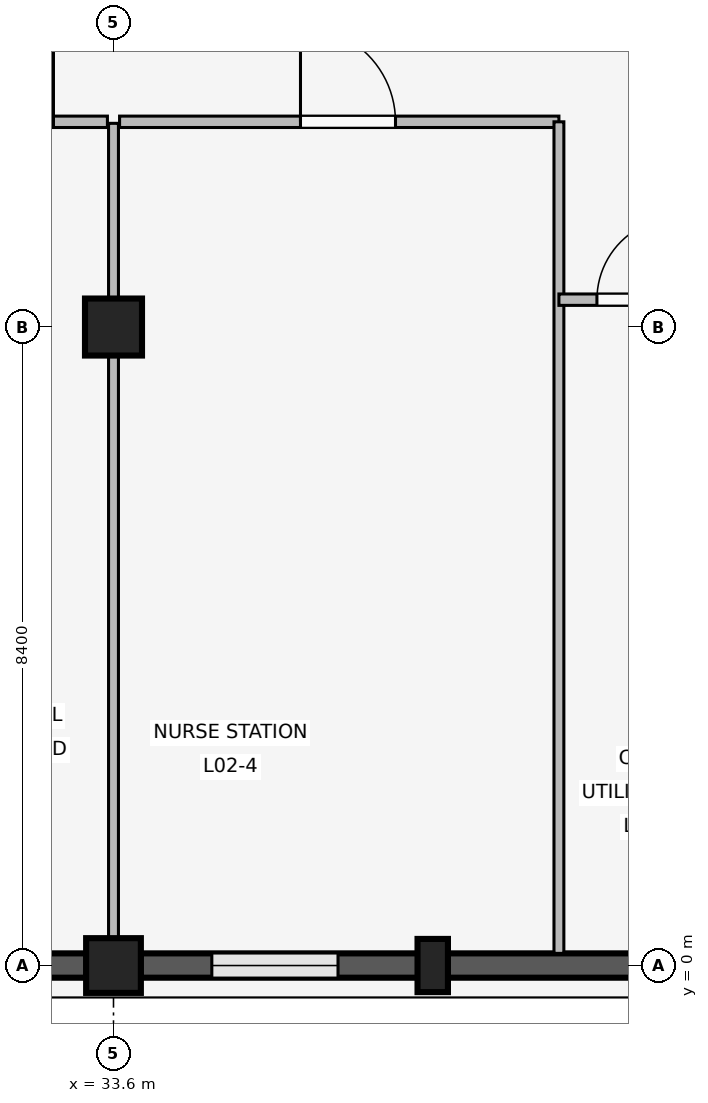
"""IFC4 building model, lengths in metres.
Left out: names, types, materials, properties, quantities, classifications, styles, units other than length and angle.
Written with IfcOpenShell. Run it as: python <this file> out.ifc"""

import sys

from ifc_helpers import new_model, si_unit, direction, frame, frame_2d, origin, origin_2d, place, context, subcontext, project, spatial, rectangle, extrude, element, fill, save


model = new_model("IFC4")
c1 = context("Model", 3, precision=1e-05, world=origin(), true_north=direction((0.0, 1.0)))
c2 = subcontext(c1, "Body", "Model", "MODEL_VIEW")
j1 = project(units=[si_unit("LENGTHUNIT", "METRE"), si_unit("PLANEANGLEUNIT", "RADIAN")], contexts=[c1])
p1 = place(None, origin())
s1 = spatial("IfcSite", under=j1, at=p1, CompositionType="ELEMENT")
p2 = place(p1, origin())
s2 = spatial("IfcBuilding", under=s1, at=p2, CompositionType="ELEMENT")
p3 = place(p2, frame((0.0, 0.0, 8.1)))
s3 = spatial("IfcBuildingStorey", under=s2, at=p3, CompositionType="ELEMENT", Elevation=8.1)
p4 = place(p3, frame((33.6, 0.0, 0.0), z_axis=(0.0, 0.0, 1.0), x_axis=(1.0, 0.0, 0.0)))
e1 = element("IfcColumn", 1, at=p4, inside=s3, PredefinedType="COLUMN", context=c2, shape_type="SweptSolid", body=[
    extrude(rectangle(XDim=0.72, YDim=0.72, at=origin_2d()), origin(), (0.0, 0.0, 1.0), 4.8),
])
p5 = place(p3, frame((33.6, 8.4, 0.0), z_axis=(0.0, 0.0, 1.0), x_axis=(1.0, 0.0, 0.0)))
e2 = element("IfcColumn", 2, at=p5, inside=s3, PredefinedType="COLUMN", context=c2, shape_type="SweptSolid", body=[
    extrude(rectangle(XDim=0.75, YDim=0.75, at=origin_2d()), origin(), (0.0, 0.0, 1.0), 4.8),
])
p6 = place(p3, frame((37.8, 0.0, 0.0), z_axis=(0.0, 0.0, 1.0), x_axis=(1.0, 0.0, 0.0)))
e3 = element("IfcColumn", 3, at=p6, inside=s3, PredefinedType="PILASTER", context=c2, shape_type="SweptSolid", body=[
    extrude(rectangle(XDim=0.4, YDim=0.7, at=origin_2d()), origin(), (0.0, 0.0, 1.0), 4.8),
])
p7 = place(p3, frame((33.245, 0.0, 0.0), z_axis=(0.0, 0.0, 1.0), x_axis=(-1.0, 0.0, 0.0)))
e4 = element("IfcWall", 4, at=p7, inside=s3, PredefinedType="SOLIDWALL", context=c2, shape_type="SweptSolid", body=[
    extrude(rectangle(XDim=7.69, YDim=0.32, at=frame_2d((3.845, 0.0))), origin(), (0.0, 0.0, 1.0), 3.86),
])
p8 = place(p7, frame((1.059, 0.0, 0.85)))
e5 = element("IfcOpeningElement", 5, at=p8, cuts=e4, PredefinedType="OPENING", context=c2, shape_type="SweptSolid", body=[
    extrude(rectangle(XDim=1.42, YDim=1.45, at=frame_2d((0.71, 0.725))), frame((0.0, 0.17, 0.0), z_axis=(0.0, -1.0, 0.0), x_axis=(1.0, 0.0, 0.0)), (0.0, 0.0, 1.0), 0.34),
])
p9 = place(p7, frame((5.211, 0.0, 0.85)))
e6 = element("IfcOpeningElement", 6, at=p9, cuts=e4, PredefinedType="OPENING", context=c2, shape_type="SweptSolid", body=[
    extrude(rectangle(XDim=1.42, YDim=1.45, at=frame_2d((0.71, 0.725))), frame((0.0, 0.17, 0.0), z_axis=(0.0, -1.0, 0.0), x_axis=(1.0, 0.0, 0.0)), (0.0, 0.0, 1.0), 0.34),
])
p10 = place(p3, frame((41.645, 0.0, 0.0), z_axis=(0.0, 0.0, 1.0), x_axis=(-1.0, 0.0, 0.0)))
e7 = element("IfcWall", 7, at=p10, inside=s3, PredefinedType="SOLIDWALL", context=c2, shape_type="SweptSolid", body=[
    extrude(rectangle(XDim=7.69, YDim=0.32, at=frame_2d((3.845, 0.0))), origin(), (0.0, 0.0, 1.0), 3.86),
])
p11 = place(p10, frame((5.091, 0.0, 0.85)))
e8 = element("IfcOpeningElement", 8, at=p11, cuts=e7, PredefinedType="OPENING", context=c2, shape_type="SweptSolid", body=[
    extrude(rectangle(XDim=1.66, YDim=1.95, at=frame_2d((0.83, 0.975))), frame((0.0, 0.17, 0.0), z_axis=(0.0, -1.0, 0.0), x_axis=(1.0, 0.0, 0.0)), (0.0, 0.0, 1.0), 0.34),
])
p12 = place(p3, frame((25.28, 11.1, 0.0), z_axis=(0.0, 0.0, 1.0), x_axis=(1.0, 0.0, 0.0)))
e9 = element("IfcWall", 9, at=p12, inside=s3, PredefinedType="PARTITIONING", context=c2, shape_type="SweptSolid", body=[
    extrude(rectangle(XDim=8.24, YDim=0.15, at=frame_2d((4.12, 0.0))), origin(), (0.0, 0.0, 1.0), 3.84),
])
p13 = place(p12, frame((2.53, 0.0, 0.0)))
e10 = element("IfcOpeningElement", 10, at=p13, cuts=e9, PredefinedType="OPENING", context=c2, shape_type="SweptSolid", body=[
    extrude(rectangle(XDim=1.3, YDim=2.25, at=frame_2d((0.65, 1.125))), frame((0.0, 0.085, 0.0), z_axis=(0.0, -1.0, 0.0), x_axis=(1.0, 0.0, 0.0)), (0.0, 0.0, 1.0), 0.17),
])
p14 = place(p12, frame((6.23, 0.0, 0.0)))
e11 = element("IfcOpeningElement", 11, at=p14, cuts=e9, PredefinedType="OPENING", context=c2, shape_type="SweptSolid", body=[
    extrude(rectangle(XDim=1.3, YDim=2.25, at=frame_2d((0.65, 1.125))), frame((0.0, 0.085, 0.0), z_axis=(0.0, -1.0, 0.0), x_axis=(1.0, 0.0, 0.0)), (0.0, 0.0, 1.0), 0.17),
])
p15 = place(p3, frame((33.6, 0.14, 0.0), z_axis=(0.0, 0.0, 1.0), x_axis=(0.0, 1.0, 0.0)))
e12 = element("IfcWall", 12, at=p15, inside=s3, PredefinedType="PARTITIONING", context=c2, shape_type="SweptSolid", body=[
    extrude(rectangle(XDim=10.94, YDim=0.13, at=frame_2d((5.47, 0.0))), origin(), (0.0, 0.0, 1.0), 3.84),
])
p16 = place(p3, frame((33.68, 11.1, 0.0), z_axis=(0.0, 0.0, 1.0), x_axis=(1.0, 0.0, 0.0)))
e13 = element("IfcWall", 13, at=p16, inside=s3, PredefinedType="PARTITIONING", context=c2, shape_type="SweptSolid", body=[
    extrude(rectangle(XDim=5.78, YDim=0.15, at=frame_2d((2.89, 0.0))), origin(), (0.0, 0.0, 1.0), 3.84),
])
p17 = place(p16, frame((2.38, 0.0, 0.0)))
e14 = element("IfcOpeningElement", 14, at=p17, cuts=e13, PredefinedType="OPENING", context=c2, shape_type="SweptSolid", body=[
    extrude(rectangle(XDim=1.25, YDim=2.2, at=frame_2d((0.625, 1.1))), frame((0.0, 0.085, 0.0), z_axis=(0.0, -1.0, 0.0), x_axis=(1.0, 0.0, 0.0)), (0.0, 0.0, 1.0), 0.17),
])
p18 = place(p3, frame((39.46, 0.16, 0.0), z_axis=(0.0, 0.0, 1.0), x_axis=(0.0, 1.0, 0.0)))
e15 = element("IfcWall", 15, at=p18, inside=s3, PredefinedType="PARTITIONING", context=c2, shape_type="SweptSolid", body=[
    extrude(rectangle(XDim=10.94, YDim=0.13, at=frame_2d((5.47, 0.0))), origin(), (0.0, 0.0, 1.0), 3.84),
])
p19 = place(p3, frame((39.46, 8.76, 0.0), z_axis=(0.0, 0.0, 1.0), x_axis=(1.0, 0.0, 0.0)))
e16 = element("IfcWall", 16, at=p19, inside=s3, PredefinedType="PARTITIONING", context=c2, shape_type="SweptSolid", body=[
    extrude(rectangle(XDim=2.18, YDim=0.15, at=frame_2d((1.09, 0.0))), origin(), (0.0, 0.0, 1.0), 3.84),
])
p20 = place(p19, frame((0.5, 0.0, 0.0)))
e17 = element("IfcOpeningElement", 17, at=p20, cuts=e16, PredefinedType="OPENING", context=c2, shape_type="SweptSolid", body=[
    extrude(rectangle(XDim=1.08, YDim=2.15, at=frame_2d((0.54, 1.075))), frame((0.0, 0.085, 0.0), z_axis=(0.0, -1.0, 0.0), x_axis=(1.0, 0.0, 0.0)), (0.0, 0.0, 1.0), 0.17),
])
p21 = place(p11, origin())
e18 = element("IfcWindow", 18, at=p21, inside=s3, PartitioningType="SINGLE_PANEL", PredefinedType="WINDOW", context=c2, shape_type="SweptSolid", body=[
    extrude(rectangle(XDim=1.66, YDim=1.95, at=frame_2d((0.83, 0.975))), frame((0.0, 0.03, 0.0), z_axis=(0.0, -1.0, 0.0), x_axis=(1.0, 0.0, 0.0)), (0.0, 0.0, 1.0), 0.06),
])
fill(e8, e18)
p22 = place(p14, origin())
e19 = element("IfcDoor", 19, at=p22, inside=s3, OperationType="SINGLE_SWING_RIGHT", PredefinedType="DOOR", context=c2, shape_type="SweptSolid", body=[
    extrude(rectangle(XDim=1.3, YDim=2.25, at=frame_2d((0.65, 1.125))), frame((0.0, 0.025, 0.0), z_axis=(0.0, -1.0, 0.0), x_axis=(1.0, 0.0, 0.0)), (0.0, 0.0, 1.0), 0.05),
])
fill(e11, e19)
p23 = place(p17, origin())
e20 = element("IfcDoor", 20, at=p23, inside=s3, OperationType="SINGLE_SWING_LEFT", PredefinedType="DOOR", context=c2, shape_type="SweptSolid", body=[
    extrude(rectangle(XDim=1.25, YDim=2.2, at=frame_2d((0.625, 1.1))), frame((0.0, 0.025, 0.0), z_axis=(0.0, -1.0, 0.0), x_axis=(1.0, 0.0, 0.0)), (0.0, 0.0, 1.0), 0.05),
])
fill(e14, e20)
p24 = place(p20, origin())
e21 = element("IfcDoor", 21, at=p24, inside=s3, OperationType="SINGLE_SWING_RIGHT", PredefinedType="DOOR", context=c2, shape_type="SweptSolid", body=[
    extrude(rectangle(XDim=1.08, YDim=2.15, at=frame_2d((0.54, 1.075))), frame((0.0, 0.025, 0.0), z_axis=(0.0, -1.0, 0.0), x_axis=(1.0, 0.0, 0.0)), (0.0, 0.0, 1.0), 0.05),
])
fill(e17, e21)
save(model, sys.argv[1])
